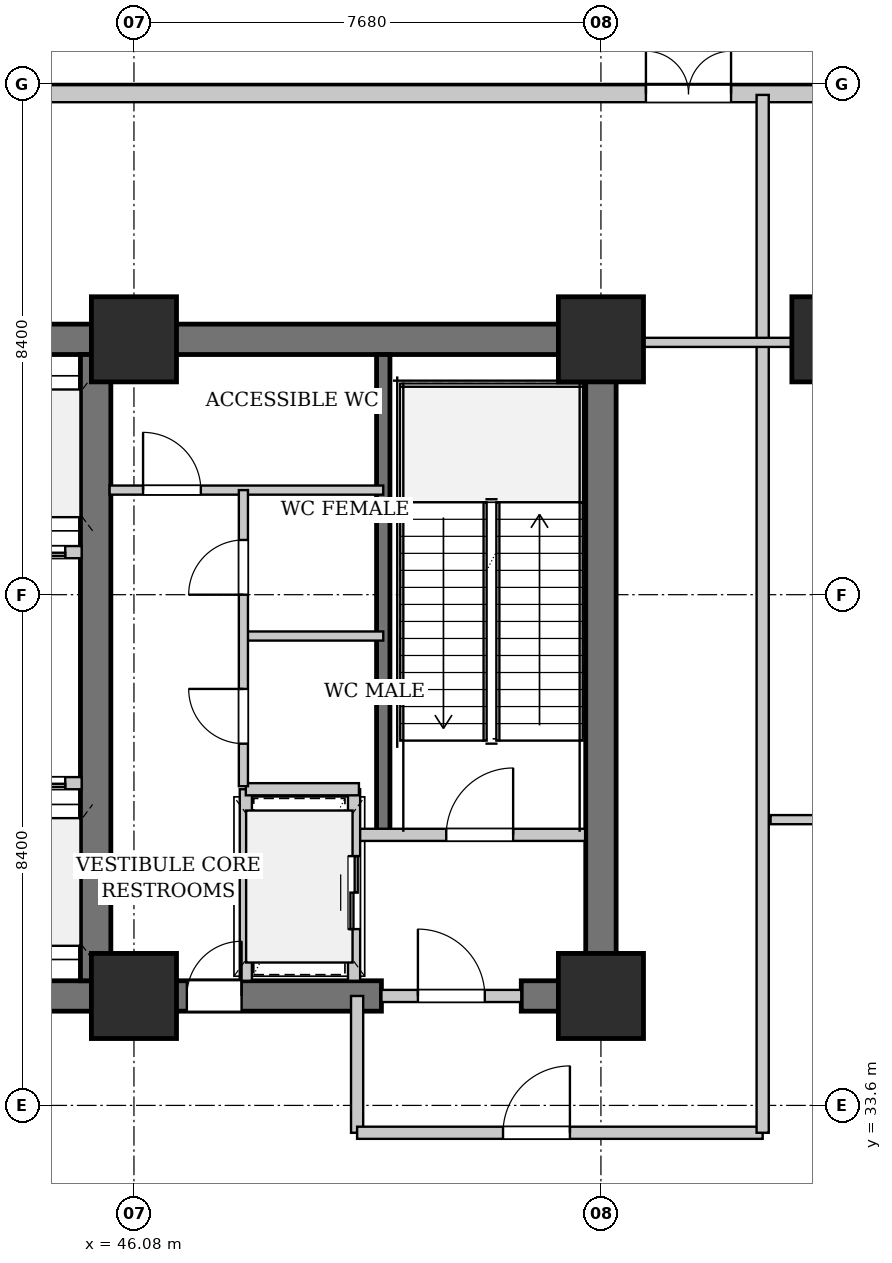
"""IFC4 building model, lengths in metres.
Left out: names, types, materials, properties, quantities, classifications, styles, units other than length and angle.
Written with IfcOpenShell. Run it as: python <this file> out.ifc"""

import sys

from ifc_helpers import new_model, si_unit, direction, frame, frame_2d, origin, origin_2d, place, context, subcontext, project, spatial, rectangle, extrude, element, fill, save


model = new_model("IFC4")
c1 = context("Model", 3, precision=1e-05, world=origin(), true_north=direction((0.0, 1.0)))
c2 = subcontext(c1, "Body", "Model", "MODEL_VIEW")
j1 = project(units=[si_unit("LENGTHUNIT", "METRE"), si_unit("PLANEANGLEUNIT", "RADIAN")], contexts=[c1])
p1 = place(None, origin())
s1 = spatial("IfcSite", under=j1, at=p1, CompositionType="ELEMENT")
p2 = place(p1, origin())
s2 = spatial("IfcBuilding", under=s1, at=p2, CompositionType="ELEMENT")
p3 = place(p2, origin())
s3 = spatial("IfcBuildingStorey", under=s2, at=p3, CompositionType="ELEMENT", Elevation=0.0)
p4 = place(p3, frame((22.79, 46.2, 0.0), z_axis=(0.0, 0.0, 1.0), x_axis=(1.0, 0.0, 0.0)))
e1 = element("IfcWall", 1, at=p4, inside=s3, PredefinedType="SHEAR", context=c2, shape_type="SweptSolid", body=[
    extrude(rectangle(XDim=31.22, YDim=0.5, at=frame_2d((15.61, 0.0))), origin(), (0.0, 0.0, 1.0), 4.94),
])
p5 = place(p3, frame((42.1, 35.4, 0.0), z_axis=(0.0, 0.0, 1.0), x_axis=(1.0, 0.0, 0.0)))
e2 = element("IfcWall", 2, at=p5, inside=s3, PredefinedType="SHEAR", context=c2, shape_type="SweptSolid", body=[
    extrude(rectangle(XDim=8.05, YDim=0.5, at=frame_2d((4.025, 0.0))), origin(), (0.0, 0.0, 1.0), 4.94),
])
p6 = place(p5, frame((4.85, 0.0, 0.0)))
e3 = element("IfcOpeningElement", 3, at=p6, cuts=e2, PredefinedType="OPENING", context=c2, shape_type="SweptSolid", body=[
    extrude(rectangle(XDim=0.9, YDim=2.15, at=frame_2d((0.45, 1.075))), frame((0.0, 0.26, 0.0), z_axis=(0.0, -1.0, 0.0), x_axis=(1.0, 0.0, 0.0)), (0.0, 0.0, 1.0), 0.52),
])
p7 = place(p3, frame((52.45, 35.4, 0.0), z_axis=(0.0, 0.0, 1.0), x_axis=(1.0, 0.0, 0.0)))
e4 = element("IfcWall", 4, at=p7, inside=s3, PredefinedType="SHEAR", context=c2, shape_type="SweptSolid", body=[
    extrude(rectangle(XDim=1.56, YDim=0.5, at=frame_2d((0.78, 0.0))), origin(), (0.0, 0.0, 1.0), 4.94),
])
for number, where, z_axis, x_axis in (
    (5, (45.45, 35.65, 0.0), (0.0, 0.0, 1.0), (0.0, 1.0, 0.0)),
    (6, (53.76, 35.65, 0.0), (0.0, 0.0, 1.0), (0.0, 1.0, 0.0)),
):
    element("IfcWall", number, at=place(p3, frame(where, z_axis=z_axis, x_axis=x_axis)), inside=s3, PredefinedType="SHEAR", context=c2, shape_type="SweptSolid", body=[
        extrude(rectangle(XDim=10.3, YDim=0.5, at=frame_2d((5.15, 0.0))), origin(), (0.0, 0.0, 1.0), 4.94),
    ])
p8 = place(p3, frame((50.18, 38.05, 0.0), z_axis=(0.0, 0.0, 1.0), x_axis=(0.0, 1.0, 0.0)))
e7 = element("IfcWall", 7, at=p8, inside=s3, PredefinedType="SHEAR", context=c2, shape_type="SweptSolid", body=[
    extrude(rectangle(XDim=7.9, YDim=0.22, at=frame_2d((3.95, 0.0))), origin(), (0.0, 0.0, 1.0), 4.94),
])
for number, where, z_axis, x_axis in (
    (8, (46.08, 35.4, 0.0), (0.0, 0.0, 1.0), (1.0, 0.0, 0.0)),
    (9, (46.08, 46.2, 0.0), (0.0, 0.0, 1.0), (1.0, 0.0, 0.0)),
    (10, (53.76, 35.4, 0.0), (0.0, 0.0, 1.0), (1.0, 0.0, 0.0)),
    (11, (53.76, 46.2, 0.0), (0.0, 0.0, 1.0), (1.0, 0.0, 0.0)),
    (12, (57.6, 46.2, 0.0), (0.0, 0.0, 1.0), (1.0, 0.0, 0.0)),
):
    element("IfcColumn", number, at=place(p3, frame(where, z_axis=z_axis, x_axis=x_axis)), inside=s3, PredefinedType="COLUMN", context=c2, shape_type="SweptSolid", body=[
        extrude(rectangle(XDim=1.4, YDim=1.4, at=origin_2d()), origin(), (0.0, 0.0, 1.0), 5.2),
    ])
p9 = place(p3, frame((76.64, 50.24, 0.0), z_axis=(0.0, 0.0, 1.0), x_axis=(-1.0, 0.0, 0.0)))
e13 = element("IfcWall", 13, at=p9, inside=s3, PredefinedType="SOLIDWALL", context=c2, shape_type="SweptSolid", body=[
    extrude(rectangle(XDim=76.48, YDim=0.28, at=frame_2d((38.24, 0.0))), origin(), (0.0, 0.0, 1.0), 4.94),
])
p10 = place(p9, frame((69.14, 0.0, 0.0)))
e14 = element("IfcOpeningElement", 14, at=p10, cuts=e13, PredefinedType="OPENING", context=c2, shape_type="SweptSolid", body=[
    extrude(rectangle(XDim=6.2, YDim=4.5, at=frame_2d((3.1, 2.25))), frame((0.0, 0.15, 0.0), z_axis=(0.0, -1.0, 0.0), x_axis=(1.0, 0.0, 0.0)), (0.0, 0.0, 1.0), 0.3),
])
p11 = place(p9, frame((66.49, 0.0, 0.0)))
e15 = element("IfcOpeningElement", 15, at=p11, cuts=e13, PredefinedType="OPENING", context=c2, shape_type="SweptSolid", body=[
    extrude(rectangle(XDim=1.4, YDim=2.2, at=frame_2d((0.7, 1.1))), frame((0.0, 0.15, 0.0), z_axis=(0.0, -1.0, 0.0), x_axis=(1.0, 0.0, 0.0)), (0.0, 0.0, 1.0), 0.3),
])
p12 = place(p9, frame((56.39, 0.0, 0.0)))
e16 = element("IfcOpeningElement", 16, at=p12, cuts=e13, PredefinedType="OPENING", context=c2, shape_type="SweptSolid", body=[
    extrude(rectangle(XDim=1.4, YDim=2.2, at=frame_2d((0.7, 1.1))), frame((0.0, 0.15, 0.0), z_axis=(0.0, -1.0, 0.0), x_axis=(1.0, 0.0, 0.0)), (0.0, 0.0, 1.0), 0.3),
])
p13 = place(p9, frame((54.29, 0.0, 0.0)))
e17 = element("IfcOpeningElement", 17, at=p13, cuts=e13, PredefinedType="OPENING", context=c2, shape_type="SweptSolid", body=[
    extrude(rectangle(XDim=1.4, YDim=2.2, at=frame_2d((0.7, 1.1))), frame((0.0, 0.15, 0.0), z_axis=(0.0, -1.0, 0.0), x_axis=(1.0, 0.0, 0.0)), (0.0, 0.0, 1.0), 0.3),
])
p14 = place(p9, frame((20.74, 0.0, 0.0)))
e18 = element("IfcOpeningElement", 18, at=p14, cuts=e13, PredefinedType="OPENING", context=c2, shape_type="SweptSolid", body=[
    extrude(rectangle(XDim=1.4, YDim=2.2, at=frame_2d((0.7, 1.1))), frame((0.0, 0.15, 0.0), z_axis=(0.0, -1.0, 0.0), x_axis=(1.0, 0.0, 0.0)), (0.0, 0.0, 1.0), 0.3),
])
p15 = place(p9, frame((8.89, 0.0, 0.0)))
e19 = element("IfcOpeningElement", 19, at=p15, cuts=e13, PredefinedType="OPENING", context=c2, shape_type="SweptSolid", body=[
    extrude(rectangle(XDim=1.4, YDim=2.2, at=frame_2d((0.7, 1.1))), frame((0.0, 0.15, 0.0), z_axis=(0.0, -1.0, 0.0), x_axis=(1.0, 0.0, 0.0)), (0.0, 0.0, 1.0), 0.3),
])
p16 = place(p9, frame((60.09, 0.0, 0.0)))
e20 = element("IfcOpeningElement", 20, at=p16, cuts=e13, PredefinedType="OPENING", context=c2, shape_type="SweptSolid", body=[
    extrude(rectangle(XDim=3.2, YDim=3.4, at=frame_2d((1.6, 1.7))), frame((0.0, 0.15, 0.0), z_axis=(0.0, -1.0, 0.0), x_axis=(1.0, 0.0, 0.0)), (0.0, 0.0, 1.0), 0.3),
])
p17 = place(p9, frame((13.29, 0.0, 0.0)))
e21 = element("IfcOpeningElement", 21, at=p17, cuts=e13, PredefinedType="OPENING", context=c2, shape_type="SweptSolid", body=[
    extrude(rectangle(XDim=3.2, YDim=3.4, at=frame_2d((1.6, 1.7))), frame((0.0, 0.15, 0.0), z_axis=(0.0, -1.0, 0.0), x_axis=(1.0, 0.0, 0.0)), (0.0, 0.0, 1.0), 0.3),
])
p18 = place(p9, frame((4.99, 0.0, 0.0)))
e22 = element("IfcOpeningElement", 22, at=p18, cuts=e13, PredefinedType="OPENING", context=c2, shape_type="SweptSolid", body=[
    extrude(rectangle(XDim=3.2, YDim=3.4, at=frame_2d((1.6, 1.7))), frame((0.0, 0.15, 0.0), z_axis=(0.0, -1.0, 0.0), x_axis=(1.0, 0.0, 0.0)), (0.0, 0.0, 1.0), 0.3),
])
p19 = place(p3, frame((41.85, 38.9, 0.0), z_axis=(0.0, 0.0, 1.0), x_axis=(1.0, 0.0, 0.0)))
e23 = element("IfcWall", 23, at=p19, inside=s3, PredefinedType="PARTITIONING", context=c2, shape_type="SweptSolid", body=[
    extrude(rectangle(XDim=3.37, YDim=0.2, at=frame_2d((1.685, 0.0))), origin(), (0.0, 0.0, 1.0), 4.94),
])
p20 = place(p19, frame((0.4, 0.0, 0.0)))
e24 = element("IfcOpeningElement", 24, at=p20, cuts=e23, PredefinedType="OPENING", context=c2, shape_type="SweptSolid", body=[
    extrude(rectangle(XDim=1.0, YDim=2.2, at=frame_2d((0.5, 1.1))), frame((0.0, 0.11, 0.0), z_axis=(0.0, -1.0, 0.0), x_axis=(1.0, 0.0, 0.0)), (0.0, 0.0, 1.0), 0.22),
])
p21 = place(p19, frame((2.1, 0.0, 0.0)))
e25 = element("IfcOpeningElement", 25, at=p21, cuts=e23, PredefinedType="OPENING", context=c2, shape_type="SweptSolid", body=[
    extrude(rectangle(XDim=1.0, YDim=2.2, at=frame_2d((0.5, 1.1))), frame((0.0, 0.11, 0.0), z_axis=(0.0, -1.0, 0.0), x_axis=(1.0, 0.0, 0.0)), (0.0, 0.0, 1.0), 0.22),
])
p22 = place(p3, frame((41.85, 42.7, 0.0), z_axis=(0.0, 0.0, 1.0), x_axis=(1.0, 0.0, 0.0)))
e26 = element("IfcWall", 26, at=p22, inside=s3, PredefinedType="PARTITIONING", context=c2, shape_type="SweptSolid", body=[
    extrude(rectangle(XDim=3.37, YDim=0.2, at=frame_2d((1.685, 0.0))), origin(), (0.0, 0.0, 1.0), 4.94),
])
p23 = place(p22, frame((0.4, 0.0, 0.0)))
e27 = element("IfcOpeningElement", 27, at=p23, cuts=e26, PredefinedType="OPENING", context=c2, shape_type="SweptSolid", body=[
    extrude(rectangle(XDim=1.0, YDim=2.2, at=frame_2d((0.5, 1.1))), frame((0.0, 0.11, 0.0), z_axis=(0.0, -1.0, 0.0), x_axis=(1.0, 0.0, 0.0)), (0.0, 0.0, 1.0), 0.22),
])
p24 = place(p22, frame((2.1, 0.0, 0.0)))
e28 = element("IfcOpeningElement", 28, at=p24, cuts=e26, PredefinedType="OPENING", context=c2, shape_type="SweptSolid", body=[
    extrude(rectangle(XDim=1.0, YDim=2.2, at=frame_2d((0.5, 1.1))), frame((0.0, 0.11, 0.0), z_axis=(0.0, -1.0, 0.0), x_axis=(1.0, 0.0, 0.0)), (0.0, 0.0, 1.0), 0.22),
])
p25 = place(p3, frame((49.78, 38.05, 0.0), z_axis=(0.0, 0.0, 1.0), x_axis=(1.0, 0.0, 0.0)))
e29 = element("IfcWall", 29, at=p25, inside=s3, PredefinedType="PARTITIONING", context=c2, shape_type="SweptSolid", body=[
    extrude(rectangle(XDim=3.72, YDim=0.2, at=frame_2d((1.86, 0.0))), origin(), (0.0, 0.0, 1.0), 4.94),
])
p26 = place(p25, frame((1.436, 0.0, 0.0)))
e30 = element("IfcOpeningElement", 30, at=p26, cuts=e29, PredefinedType="OPENING", context=c2, shape_type="SweptSolid", body=[
    extrude(rectangle(XDim=1.1, YDim=2.15, at=frame_2d((0.55, 1.075))), frame((0.0, 0.11, 0.0), z_axis=(0.0, -1.0, 0.0), x_axis=(1.0, 0.0, 0.0)), (0.0, 0.0, 1.0), 0.22),
])
p27 = place(p3, frame((50.15, 35.4, 0.0), z_axis=(0.0, 0.0, 1.0), x_axis=(1.0, 0.0, 0.0)))
e31 = element("IfcWall", 31, at=p27, inside=s3, PredefinedType="PARTITIONING", context=c2, shape_type="SweptSolid", body=[
    extrude(rectangle(XDim=2.3, YDim=0.2, at=frame_2d((1.15, 0.0))), origin(), (0.0, 0.0, 1.0), 3.935),
])
p28 = place(p27, frame((0.6, 0.0, 0.0)))
e32 = element("IfcOpeningElement", 32, at=p28, cuts=e31, PredefinedType="OPENING", context=c2, shape_type="SweptSolid", body=[
    extrude(rectangle(XDim=1.1, YDim=2.15, at=frame_2d((0.55, 1.075))), frame((0.0, 0.11, 0.0), z_axis=(0.0, -1.0, 0.0), x_axis=(1.0, 0.0, 0.0)), (0.0, 0.0, 1.0), 0.22),
])
p29 = place(p3, frame((49.7, 35.65, 0.0), z_axis=(0.0, 0.0, 1.0), x_axis=(0.0, 1.0, 0.0)))
e33 = element("IfcWall", 33, at=p29, inside=s3, PredefinedType="PARTITIONING", context=c2, shape_type="SweptSolid", body=[
    extrude(rectangle(XDim=3.15, YDim=0.2, at=frame_2d((1.575, 0.0))), origin(), (0.0, 0.0, 1.0), 4.94),
])
p30 = place(p29, frame((0.85, 0.0, 0.0)))
e34 = element("IfcOpeningElement", 34, at=p30, cuts=e33, PredefinedType="OPENING", context=c2, shape_type="SweptSolid", body=[
    extrude(rectangle(XDim=1.2, YDim=2.2, at=frame_2d((0.6, 1.1))), frame((0.0, 0.11, 0.0), z_axis=(0.0, -1.0, 0.0), x_axis=(1.0, 0.0, 0.0)), (0.0, 0.0, 1.0), 0.22),
])
p31 = place(p3, frame((47.92, 35.65, 0.0), z_axis=(0.0, 0.0, 1.0), x_axis=(0.0, 1.0, 0.0)))
e35 = element("IfcWall", 35, at=p31, inside=s3, PredefinedType="PARTITIONING", context=c2, shape_type="SweptSolid", body=[
    extrude(rectangle(XDim=3.15, YDim=0.2, at=frame_2d((1.575, 0.0))), origin(), (0.0, 0.0, 1.0), 4.94),
])
p32 = place(p3, frame((47.92, 38.8, 0.0), z_axis=(0.0, 0.0, 1.0), x_axis=(1.0, 0.0, 0.0)))
e36 = element("IfcWall", 36, at=p32, inside=s3, PredefinedType="PARTITIONING", context=c2, shape_type="SweptSolid", body=[
    extrude(rectangle(XDim=1.86, YDim=0.2, at=frame_2d((0.93, 0.0))), origin(), (0.0, 0.0, 1.0), 4.94),
])
p33 = place(p3, frame((45.68, 43.72, 0.0), z_axis=(0.0, 0.0, 1.0), x_axis=(1.0, 0.0, 0.0)))
e37 = element("IfcWall", 37, at=p33, inside=s3, PredefinedType="PARTITIONING", context=c2, shape_type="SweptSolid", body=[
    extrude(rectangle(XDim=4.5, YDim=0.15, at=frame_2d((2.25, 0.0))), origin(), (0.0, 0.0, 1.0), 4.94),
])
p34 = place(p33, frame((0.55, 0.0, 0.0)))
e38 = element("IfcOpeningElement", 38, at=p34, cuts=e37, PredefinedType="OPENING", context=c2, shape_type="SweptSolid", body=[
    extrude(rectangle(XDim=0.95, YDim=2.15, at=frame_2d((0.475, 1.075))), frame((0.0, 0.085, 0.0), z_axis=(0.0, -1.0, 0.0), x_axis=(1.0, 0.0, 0.0)), (0.0, 0.0, 1.0), 0.17),
])
p35 = place(p3, frame((47.88, 41.32, 0.0), z_axis=(0.0, 0.0, 1.0), x_axis=(1.0, 0.0, 0.0)))
e39 = element("IfcWall", 39, at=p35, inside=s3, PredefinedType="PARTITIONING", context=c2, shape_type="SweptSolid", body=[
    extrude(rectangle(XDim=2.3, YDim=0.15, at=frame_2d((1.15, 0.0))), origin(), (0.0, 0.0, 1.0), 4.94),
])
p36 = place(p3, frame((47.88, 38.85, 0.0), z_axis=(0.0, 0.0, 1.0), x_axis=(0.0, 1.0, 0.0)))
e40 = element("IfcWall", 40, at=p36, inside=s3, PredefinedType="PARTITIONING", context=c2, shape_type="SweptSolid", body=[
    extrude(rectangle(XDim=4.87, YDim=0.15, at=frame_2d((2.435, 0.0))), origin(), (0.0, 0.0, 1.0), 4.94),
])
p37 = place(p36, frame((0.7, 0.0, 0.0)))
e41 = element("IfcOpeningElement", 41, at=p37, cuts=e40, PredefinedType="OPENING", context=c2, shape_type="SweptSolid", body=[
    extrude(rectangle(XDim=0.9, YDim=2.15, at=frame_2d((0.45, 1.075))), frame((0.0, 0.085, 0.0), z_axis=(0.0, -1.0, 0.0), x_axis=(1.0, 0.0, 0.0)), (0.0, 0.0, 1.0), 0.17),
])
p38 = place(p36, frame((3.15, 0.0, 0.0)))
e42 = element("IfcOpeningElement", 42, at=p38, cuts=e40, PredefinedType="OPENING", context=c2, shape_type="SweptSolid", body=[
    extrude(rectangle(XDim=0.9, YDim=2.15, at=frame_2d((0.45, 1.075))), frame((0.0, 0.085, 0.0), z_axis=(0.0, -1.0, 0.0), x_axis=(1.0, 0.0, 0.0)), (0.0, 0.0, 1.0), 0.17),
])
p39 = place(p3, frame((49.75, 33.15, 0.0), z_axis=(0.0, 0.0, 1.0), x_axis=(0.0, 1.0, 0.0)))
e43 = element("IfcWall", 43, at=p39, inside=s3, PredefinedType="PARTITIONING", context=c2, shape_type="SweptSolid", body=[
    extrude(rectangle(XDim=2.25, YDim=0.2, at=frame_2d((1.125, 0.0))), origin(), (0.0, 0.0, 1.0), 4.94),
])
p40 = place(p3, frame((49.75, 33.15, 0.0), z_axis=(0.0, 0.0, 1.0), x_axis=(1.0, 0.0, 0.0)))
e44 = element("IfcWall", 44, at=p40, inside=s3, PredefinedType="PARTITIONING", context=c2, shape_type="SweptSolid", body=[
    extrude(rectangle(XDim=6.67, YDim=0.2, at=frame_2d((3.335, 0.0))), origin(), (0.0, 0.0, 1.0), 4.94),
])
p41 = place(p40, frame((2.4, 0.0, 0.0)))
e45 = element("IfcOpeningElement", 45, at=p41, cuts=e44, PredefinedType="OPENING", context=c2, shape_type="SweptSolid", body=[
    extrude(rectangle(XDim=1.1, YDim=2.15, at=frame_2d((0.55, 1.075))), frame((0.0, 0.11, 0.0), z_axis=(0.0, -1.0, 0.0), x_axis=(1.0, 0.0, 0.0)), (0.0, 0.0, 1.0), 0.22),
])
p42 = place(p3, frame((56.42, 33.15, 0.0), z_axis=(0.0, 0.0, 1.0), x_axis=(0.0, 1.0, 0.0)))
e46 = element("IfcWall", 46, at=p42, inside=s3, PredefinedType="PARTITIONING", context=c2, shape_type="SweptSolid", body=[
    extrude(rectangle(XDim=17.07, YDim=0.2, at=frame_2d((8.535, 0.0))), origin(), (0.0, 0.0, 1.0), 4.94),
])
p43 = place(p3, frame((56.55, 38.3, 0.0), z_axis=(0.0, 0.0, 1.0), x_axis=(1.0, 0.0, 0.0)))
e47 = element("IfcWall", 47, at=p43, inside=s3, PredefinedType="PARTITIONING", context=c2, shape_type="SweptSolid", body=[
    extrude(rectangle(XDim=7.85, YDim=0.15, at=frame_2d((3.925, 0.0))), origin(), (0.0, 0.0, 1.0), 4.94),
])
p44 = place(p43, frame((3.375, 0.0, 0.0)))
e48 = element("IfcOpeningElement", 48, at=p44, cuts=e47, PredefinedType="OPENING", context=c2, shape_type="SweptSolid", body=[
    extrude(rectangle(XDim=1.1, YDim=2.15, at=frame_2d((0.55, 1.075))), frame((0.0, 0.085, 0.0), z_axis=(0.0, -1.0, 0.0), x_axis=(1.0, 0.0, 0.0)), (0.0, 0.0, 1.0), 0.17),
])
p45 = place(p3, frame((54.05, 46.15, 0.0), z_axis=(0.0, 0.0, 1.0), x_axis=(1.0, 0.0, 0.0)))
e49 = element("IfcWall", 49, at=p45, inside=s3, PredefinedType="PARTITIONING", context=c2, shape_type="SweptSolid", body=[
    extrude(rectangle(XDim=10.35, YDim=0.15, at=frame_2d((5.175, 0.0))), origin(), (0.0, 0.0, 1.0), 4.94),
])
p46 = place(p14, frame((1.4, 0.0, 0.0), z_axis=(0.0, 0.0, 1.0), x_axis=(-1.0, 0.0, 0.0)))
e50 = element("IfcDoor", 50, at=p46, inside=s3, OperationType="SINGLE_SWING_LEFT", PredefinedType="DOOR", context=c2, shape_type="SweptSolid", body=[
    extrude(rectangle(XDim=1.4, YDim=2.2, at=frame_2d((0.7, 1.1))), frame((0.0, 0.025, 0.0), z_axis=(0.0, -1.0, 0.0), x_axis=(1.0, 0.0, 0.0)), (0.0, 0.0, 1.0), 0.05),
])
fill(e18, e50)
p47 = place(p21, origin())
e51 = element("IfcDoor", 51, at=p47, inside=s3, OperationType="DOUBLE_DOOR_SLIDING", PredefinedType="DOOR", context=c2, shape_type="SweptSolid", body=[
    extrude(rectangle(XDim=1.0, YDim=2.2, at=frame_2d((0.5, 1.1))), frame((0.0, 0.025, 0.0), z_axis=(0.0, -1.0, 0.0), x_axis=(1.0, 0.0, 0.0)), (0.0, 0.0, 1.0), 0.05),
])
fill(e25, e51)
p48 = place(p24, origin())
e52 = element("IfcDoor", 52, at=p48, inside=s3, OperationType="DOUBLE_DOOR_SLIDING", PredefinedType="DOOR", context=c2, shape_type="SweptSolid", body=[
    extrude(rectangle(XDim=1.0, YDim=2.2, at=frame_2d((0.5, 1.1))), frame((0.0, 0.025, 0.0), z_axis=(0.0, -1.0, 0.0), x_axis=(1.0, 0.0, 0.0)), (0.0, 0.0, 1.0), 0.05),
])
fill(e28, e52)
p49 = place(p26, origin())
e53 = element("IfcDoor", 53, at=p49, inside=s3, OperationType="SINGLE_SWING_RIGHT", PredefinedType="DOOR", context=c2, shape_type="SweptSolid", body=[
    extrude(rectangle(XDim=1.1, YDim=2.15, at=frame_2d((0.55, 1.075))), frame((0.0, 0.025, 0.0), z_axis=(0.0, -1.0, 0.0), x_axis=(1.0, 0.0, 0.0)), (0.0, 0.0, 1.0), 0.05),
])
fill(e30, e53)
p50 = place(p28, origin())
e54 = element("IfcDoor", 54, at=p50, inside=s3, OperationType="SINGLE_SWING_LEFT", PredefinedType="DOOR", context=c2, shape_type="SweptSolid", body=[
    extrude(rectangle(XDim=1.1, YDim=2.15, at=frame_2d((0.55, 1.075))), frame((0.0, 0.025, 0.0), z_axis=(0.0, -1.0, 0.0), x_axis=(1.0, 0.0, 0.0)), (0.0, 0.0, 1.0), 0.05),
])
fill(e32, e54)
p51 = place(p30, origin())
e55 = element("IfcDoor", 55, at=p51, inside=s3, OperationType="DOUBLE_DOOR_SLIDING", PredefinedType="DOOR", context=c2, shape_type="SweptSolid", body=[
    extrude(rectangle(XDim=1.2, YDim=2.2, at=frame_2d((0.6, 1.1))), frame((0.0, 0.025, 0.0), z_axis=(0.0, -1.0, 0.0), x_axis=(1.0, 0.0, 0.0)), (0.0, 0.0, 1.0), 0.05),
])
fill(e34, e55)
p52 = place(p34, origin())
e56 = element("IfcDoor", 56, at=p52, inside=s3, OperationType="SINGLE_SWING_LEFT", PredefinedType="DOOR", context=c2, shape_type="SweptSolid", body=[
    extrude(rectangle(XDim=0.95, YDim=2.15, at=frame_2d((0.475, 1.075))), frame((0.0, 0.025, 0.0), z_axis=(0.0, -1.0, 0.0), x_axis=(1.0, 0.0, 0.0)), (0.0, 0.0, 1.0), 0.05),
])
fill(e38, e56)
p53 = place(p37, origin())
e57 = element("IfcDoor", 57, at=p53, inside=s3, OperationType="SINGLE_SWING_RIGHT", PredefinedType="DOOR", context=c2, shape_type="SweptSolid", body=[
    extrude(rectangle(XDim=0.9, YDim=2.15, at=frame_2d((0.45, 1.075))), frame((0.0, 0.025, 0.0), z_axis=(0.0, -1.0, 0.0), x_axis=(1.0, 0.0, 0.0)), (0.0, 0.0, 1.0), 0.05),
])
fill(e41, e57)
p54 = place(p38, origin())
e58 = element("IfcDoor", 58, at=p54, inside=s3, OperationType="SINGLE_SWING_LEFT", PredefinedType="DOOR", context=c2, shape_type="SweptSolid", body=[
    extrude(rectangle(XDim=0.9, YDim=2.15, at=frame_2d((0.45, 1.075))), frame((0.0, 0.025, 0.0), z_axis=(0.0, -1.0, 0.0), x_axis=(1.0, 0.0, 0.0)), (0.0, 0.0, 1.0), 0.05),
])
fill(e42, e58)
p55 = place(p41, origin())
e59 = element("IfcDoor", 59, at=p55, inside=s3, OperationType="SINGLE_SWING_RIGHT", PredefinedType="DOOR", context=c2, shape_type="SweptSolid", body=[
    extrude(rectangle(XDim=1.1, YDim=2.15, at=frame_2d((0.55, 1.075))), frame((0.0, 0.025, 0.0), z_axis=(0.0, -1.0, 0.0), x_axis=(1.0, 0.0, 0.0)), (0.0, 0.0, 1.0), 0.05),
])
fill(e45, e59)
p56 = place(p6, origin())
e60 = element("IfcDoor", 60, at=p56, inside=s3, OperationType="SINGLE_SWING_RIGHT", PredefinedType="DOOR", context=c2, shape_type="SweptSolid", body=[
    extrude(rectangle(XDim=0.9, YDim=2.15, at=frame_2d((0.45, 1.075))), frame((0.0, 0.025, 0.0), z_axis=(0.0, -1.0, 0.0), x_axis=(1.0, 0.0, 0.0)), (0.0, 0.0, 1.0), 0.05),
])
fill(e3, e60)
save(model, sys.argv[1])
